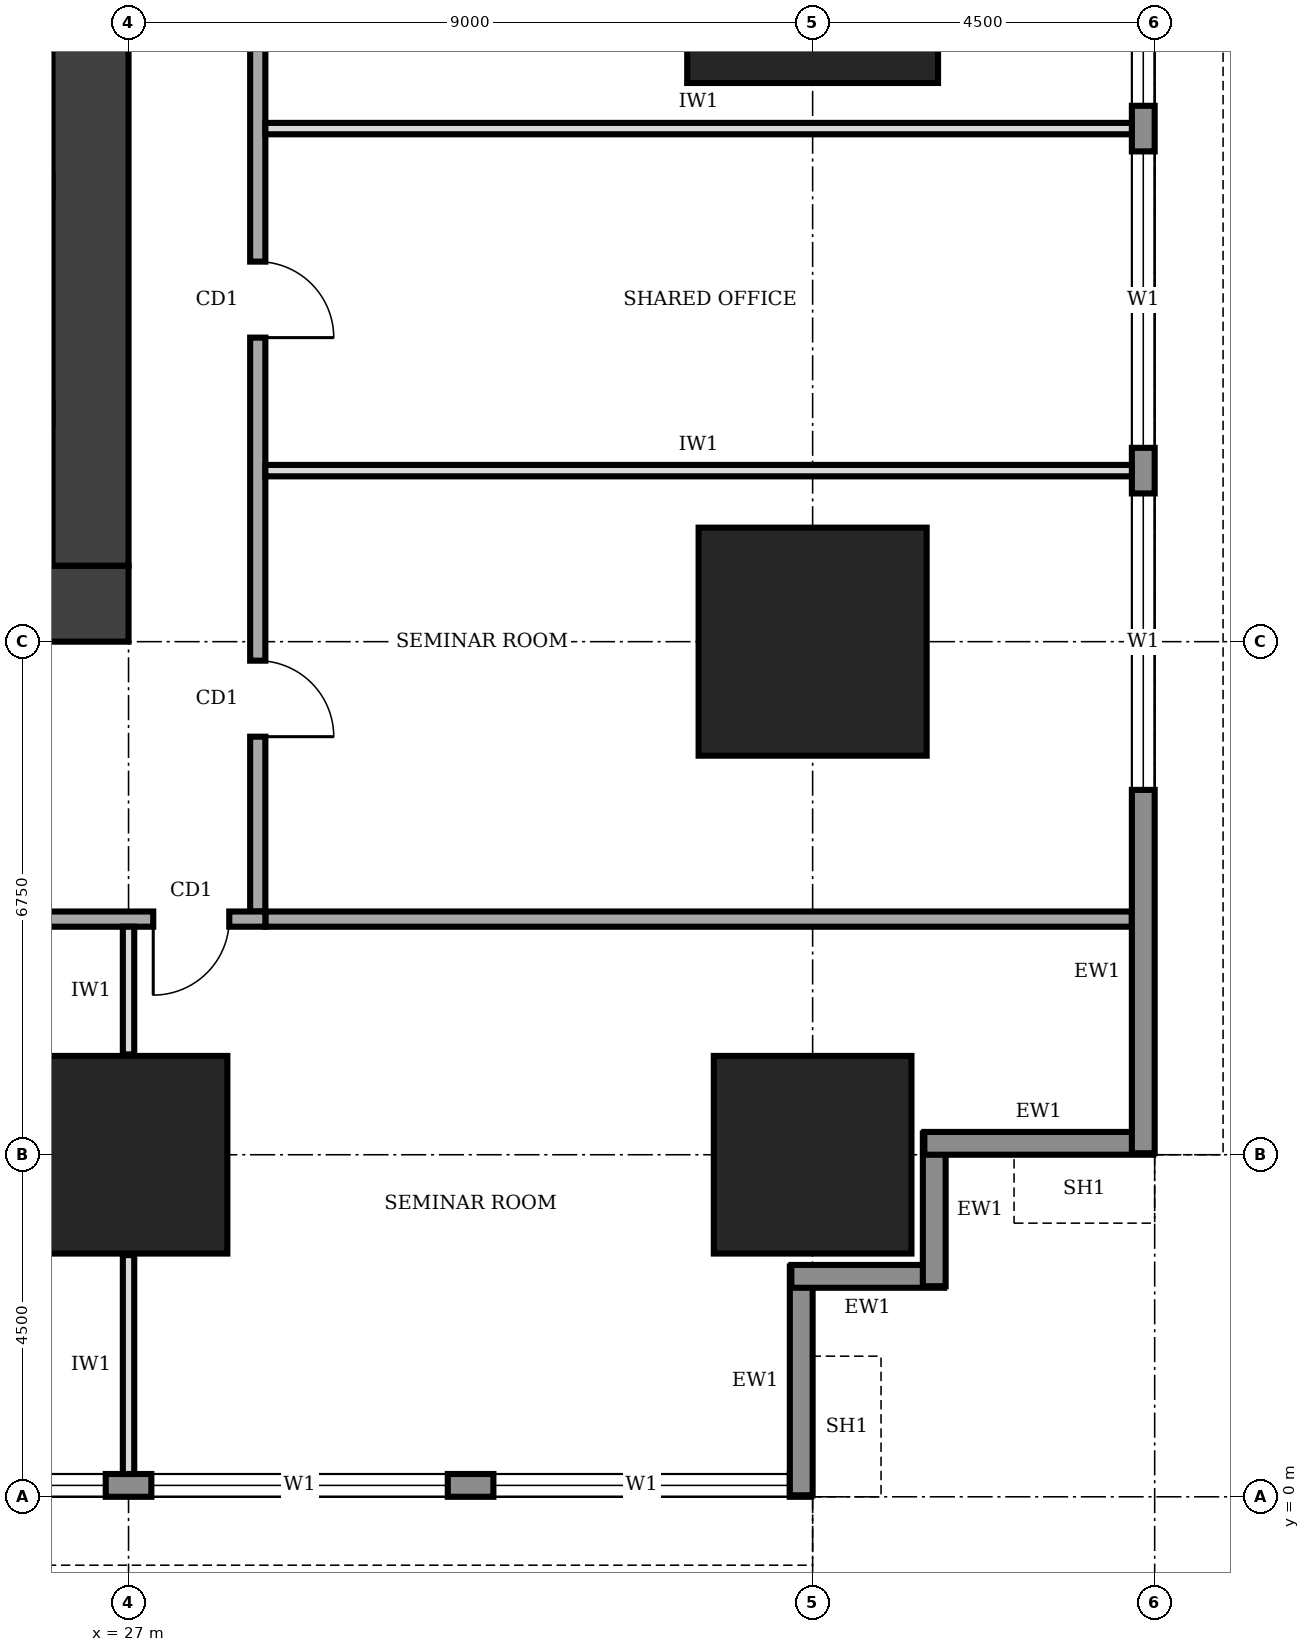
"""IFC4 building model, lengths in metres.
Left out: names, types, materials, properties, quantities, classifications, styles, units other than length and angle.
Written with IfcOpenShell. Run it as: python <this file> out.ifc"""

import sys

from ifc_helpers import new_model, si_unit, direction, frame, frame_2d, origin, origin_2d, place, context, subcontext, project, spatial, rectangle, extrude, element, fill, save


model = new_model("IFC4")
c1 = context("Model", 3, precision=1e-05, world=origin(), true_north=direction((0.0, 1.0)))
c2 = subcontext(c1, "Body", "Model", "MODEL_VIEW")
j1 = project(units=[si_unit("LENGTHUNIT", "METRE"), si_unit("PLANEANGLEUNIT", "RADIAN")], contexts=[c1])
p1 = place(None, origin())
s1 = spatial("IfcSite", under=j1, at=p1, CompositionType="ELEMENT")
p2 = place(p1, origin())
s2 = spatial("IfcBuilding", under=s1, at=p2, CompositionType="ELEMENT")
p3 = place(p2, frame((0.0, 0.0, 29.0)))
s3 = spatial("IfcBuildingStorey", under=s2, at=p3, CompositionType="ELEMENT", Elevation=29.0)
p4 = place(p3, frame((13.5, 11.75, 0.0), z_axis=(0.0, 0.0, 1.0), x_axis=(1.0, 0.0, 0.0)))
e1 = element("IfcWall", 1, at=p4, inside=s3, PredefinedType="SHEAR", context=c2, shape_type="SweptSolid", body=[
    extrude(rectangle(XDim=13.5, YDim=1.0, at=frame_2d((6.75, 0.0))), origin(), (0.0, 0.0, 1.0), 4.0),
])
p5 = place(p4, frame((4.75, 0.0, 0.0)))
e2 = element("IfcOpeningElement", 2, at=p5, cuts=e1, PredefinedType="OPENING", context=c2, shape_type="SweptSolid", body=[
    extrude(rectangle(XDim=1.0, YDim=2.1, at=frame_2d((0.5, 1.05))), frame((0.0, 0.51, 0.0), z_axis=(0.0, -1.0, 0.0), x_axis=(1.0, 0.0, 0.0)), (0.0, 0.0, 1.0), 1.02),
])
p6 = place(p3, frame((26.5, 12.25, 0.0), z_axis=(0.0, 0.0, 1.0), x_axis=(0.0, 1.0, 0.0)))
e3 = element("IfcWall", 3, at=p6, inside=s3, PredefinedType="SHEAR", context=c2, shape_type="SweptSolid", body=[
    extrude(rectangle(XDim=16.0, YDim=1.0, at=frame_2d((8.0, 0.0))), origin(), (0.0, 0.0, 1.0), 4.0),
])
for number, where, z_axis, x_axis in (
    (4, (27.0, 4.5, 0.0), (0.0, 0.0, 1.0), (1.0, 0.0, 0.0)),
    (5, (36.0, 4.5, 0.0), (0.0, 0.0, 1.0), (1.0, 0.0, 0.0)),
):
    element("IfcColumn", number, at=place(p3, frame(where, z_axis=z_axis, x_axis=x_axis)), inside=s3, PredefinedType="COLUMN", context=c2, shape_type="SweptSolid", body=[
        extrude(rectangle(XDim=2.6, YDim=2.6, at=origin_2d()), origin(), (0.0, 0.0, 1.0), 4.0),
    ])
p7 = place(p3, frame((36.0, 11.25, 0.0), z_axis=(0.0, 0.0, 1.0), x_axis=(1.0, 0.0, 0.0)))
e6 = element("IfcColumn", 6, at=p7, inside=s3, PredefinedType="COLUMN", context=c2, shape_type="SweptSolid", body=[
    extrude(rectangle(XDim=3.0, YDim=3.0, at=origin_2d()), origin(), (0.0, 0.0, 1.0), 4.0),
])
p8 = place(p3, frame((36.0, 20.25, 0.0), z_axis=(0.0, 0.0, 1.0), x_axis=(1.0, 0.0, 0.0)))
e7 = element("IfcColumn", 7, at=p8, inside=s3, PredefinedType="COLUMN", context=c2, shape_type="SweptSolid", body=[
    extrude(rectangle(XDim=3.3, YDim=3.3, at=origin_2d()), origin(), (0.0, 0.0, 1.0), 4.0),
])
p9 = place(p3, frame((4.52, 0.15, 0.0), z_axis=(0.0, 0.0, 1.0), x_axis=(1.0, 0.0, 0.0)))
e8 = element("IfcWall", 8, at=p9, inside=s3, PredefinedType="STANDARD", context=c2, shape_type="SweptSolid", body=[
    extrude(rectangle(XDim=31.46, YDim=0.3, at=frame_2d((15.73, 0.0))), origin(), (0.0, 0.0, 1.0), 3.75),
])
p10 = place(p9, frame((4.78, 0.0, 0.9)))
e9 = element("IfcOpeningElement", 9, at=p10, cuts=e8, PredefinedType="OPENING", context=c2, shape_type="SweptSolid", body=[
    extrude(rectangle(XDim=3.9, YDim=2.2, at=frame_2d((1.95, 1.1))), frame((0.0, 0.16, 0.0), z_axis=(0.0, -1.0, 0.0), x_axis=(1.0, 0.0, 0.0)), (0.0, 0.0, 1.0), 0.32),
])
p11 = place(p9, frame((9.28, 0.0, 0.9)))
e10 = element("IfcOpeningElement", 10, at=p11, cuts=e8, PredefinedType="OPENING", context=c2, shape_type="SweptSolid", body=[
    extrude(rectangle(XDim=3.9, YDim=2.2, at=frame_2d((1.95, 1.1))), frame((0.0, 0.16, 0.0), z_axis=(0.0, -1.0, 0.0), x_axis=(1.0, 0.0, 0.0)), (0.0, 0.0, 1.0), 0.32),
])
p12 = place(p9, frame((13.78, 0.0, 0.9)))
e11 = element("IfcOpeningElement", 11, at=p12, cuts=e8, PredefinedType="OPENING", context=c2, shape_type="SweptSolid", body=[
    extrude(rectangle(XDim=3.9, YDim=2.2, at=frame_2d((1.95, 1.1))), frame((0.0, 0.16, 0.0), z_axis=(0.0, -1.0, 0.0), x_axis=(1.0, 0.0, 0.0)), (0.0, 0.0, 1.0), 0.32),
])
p13 = place(p9, frame((18.28, 0.0, 0.9)))
e12 = element("IfcOpeningElement", 12, at=p13, cuts=e8, PredefinedType="OPENING", context=c2, shape_type="SweptSolid", body=[
    extrude(rectangle(XDim=3.9, YDim=2.2, at=frame_2d((1.95, 1.1))), frame((0.0, 0.16, 0.0), z_axis=(0.0, -1.0, 0.0), x_axis=(1.0, 0.0, 0.0)), (0.0, 0.0, 1.0), 0.32),
])
p14 = place(p9, frame((22.78, 0.0, 0.9)))
e13 = element("IfcOpeningElement", 13, at=p14, cuts=e8, PredefinedType="OPENING", context=c2, shape_type="SweptSolid", body=[
    extrude(rectangle(XDim=3.9, YDim=2.2, at=frame_2d((1.95, 1.1))), frame((0.0, 0.16, 0.0), z_axis=(0.0, -1.0, 0.0), x_axis=(1.0, 0.0, 0.0)), (0.0, 0.0, 1.0), 0.32),
])
p15 = place(p9, frame((27.28, 0.0, 0.9)))
e14 = element("IfcOpeningElement", 14, at=p15, cuts=e8, PredefinedType="OPENING", context=c2, shape_type="SweptSolid", body=[
    extrude(rectangle(XDim=3.9, YDim=2.2, at=frame_2d((1.95, 1.1))), frame((0.0, 0.16, 0.0), z_axis=(0.0, -1.0, 0.0), x_axis=(1.0, 0.0, 0.0)), (0.0, 0.0, 1.0), 0.32),
])
p16 = place(p3, frame((35.85, 0.02, 0.0), z_axis=(0.0, 0.0, 1.0), x_axis=(0.0, 1.0, 0.0)))
e15 = element("IfcWall", 15, at=p16, inside=s3, PredefinedType="STANDARD", context=c2, shape_type="SweptSolid", body=[
    extrude(rectangle(XDim=3.01, YDim=0.3, at=frame_2d((1.505, 0.0))), origin(), (0.0, 0.0, 1.0), 2.85),
])
for number, where, z_axis, x_axis in (
    (16, (35.72, 2.9, 0.0), (0.0, 0.0, 1.0), (1.0, 0.0, 0.0)),
    (17, (37.6, 2.77, 0.0), (0.0, 0.0, 1.0), (0.0, 1.0, 0.0)),
):
    element("IfcWall", number, at=place(p3, frame(where, z_axis=z_axis, x_axis=x_axis)), inside=s3, PredefinedType="STANDARD", context=c2, shape_type="SweptSolid", body=[
        extrude(rectangle(XDim=2.01, YDim=0.3, at=frame_2d((1.005, 0.0))), origin(), (0.0, 0.0, 1.0), 3.75),
    ])
p17 = place(p3, frame((37.47, 4.65, 0.0), z_axis=(0.0, 0.0, 1.0), x_axis=(1.0, 0.0, 0.0)))
e18 = element("IfcWall", 18, at=p17, inside=s3, PredefinedType="STANDARD", context=c2, shape_type="SweptSolid", body=[
    extrude(rectangle(XDim=3.01, YDim=0.3, at=frame_2d((1.505, 0.0))), origin(), (0.0, 0.0, 1.0), 2.85),
])
p18 = place(p3, frame((40.35, 4.52, 0.0), z_axis=(0.0, 0.0, 1.0), x_axis=(0.0, 1.0, 0.0)))
e19 = element("IfcWall", 19, at=p18, inside=s3, PredefinedType="STANDARD", context=c2, shape_type="SweptSolid", body=[
    extrude(rectangle(XDim=31.46, YDim=0.3, at=frame_2d((15.73, 0.0))), origin(), (0.0, 0.0, 1.0), 3.75),
])
p19 = place(p18, frame((4.78, 0.0, 0.9)))
e20 = element("IfcOpeningElement", 20, at=p19, cuts=e19, PredefinedType="OPENING", context=c2, shape_type="SweptSolid", body=[
    extrude(rectangle(XDim=3.9, YDim=2.2, at=frame_2d((1.95, 1.1))), frame((0.0, 0.16, 0.0), z_axis=(0.0, -1.0, 0.0), x_axis=(1.0, 0.0, 0.0)), (0.0, 0.0, 1.0), 0.32),
])
p20 = place(p18, frame((9.28, 0.0, 0.9)))
e21 = element("IfcOpeningElement", 21, at=p20, cuts=e19, PredefinedType="OPENING", context=c2, shape_type="SweptSolid", body=[
    extrude(rectangle(XDim=3.9, YDim=2.2, at=frame_2d((1.95, 1.1))), frame((0.0, 0.16, 0.0), z_axis=(0.0, -1.0, 0.0), x_axis=(1.0, 0.0, 0.0)), (0.0, 0.0, 1.0), 0.32),
])
p21 = place(p18, frame((13.78, 0.0, 0.9)))
e22 = element("IfcOpeningElement", 22, at=p21, cuts=e19, PredefinedType="OPENING", context=c2, shape_type="SweptSolid", body=[
    extrude(rectangle(XDim=3.9, YDim=2.2, at=frame_2d((1.95, 1.1))), frame((0.0, 0.16, 0.0), z_axis=(0.0, -1.0, 0.0), x_axis=(1.0, 0.0, 0.0)), (0.0, 0.0, 1.0), 0.32),
])
p22 = place(p18, frame((18.28, 0.0, 0.9)))
e23 = element("IfcOpeningElement", 23, at=p22, cuts=e19, PredefinedType="OPENING", context=c2, shape_type="SweptSolid", body=[
    extrude(rectangle(XDim=3.9, YDim=2.2, at=frame_2d((1.95, 1.1))), frame((0.0, 0.16, 0.0), z_axis=(0.0, -1.0, 0.0), x_axis=(1.0, 0.0, 0.0)), (0.0, 0.0, 1.0), 0.32),
])
p23 = place(p18, frame((22.78, 0.0, 0.9)))
e24 = element("IfcOpeningElement", 24, at=p23, cuts=e19, PredefinedType="OPENING", context=c2, shape_type="SweptSolid", body=[
    extrude(rectangle(XDim=3.9, YDim=2.2, at=frame_2d((1.95, 1.1))), frame((0.0, 0.16, 0.0), z_axis=(0.0, -1.0, 0.0), x_axis=(1.0, 0.0, 0.0)), (0.0, 0.0, 1.0), 0.32),
])
p24 = place(p18, frame((27.28, 0.0, 0.9)))
e25 = element("IfcOpeningElement", 25, at=p24, cuts=e19, PredefinedType="OPENING", context=c2, shape_type="SweptSolid", body=[
    extrude(rectangle(XDim=3.9, YDim=2.2, at=frame_2d((1.95, 1.1))), frame((0.0, 0.16, 0.0), z_axis=(0.0, -1.0, 0.0), x_axis=(1.0, 0.0, 0.0)), (0.0, 0.0, 1.0), 0.32),
])
p25 = place(p3, frame((11.9, 7.6, 0.0), z_axis=(0.0, 0.0, 1.0), x_axis=(1.0, 0.0, 0.0)))
e26 = element("IfcWall", 26, at=p25, inside=s3, PredefinedType="SOLIDWALL", context=c2, shape_type="SweptSolid", body=[
    extrude(rectangle(XDim=16.9, YDim=0.2, at=frame_2d((8.45, 0.0))), origin(), (0.0, 0.0, 1.0), 3.75),
])
p26 = place(p25, frame((0.275, 0.0, 0.0)))
e27 = element("IfcOpeningElement", 27, at=p26, cuts=e26, PredefinedType="OPENING", context=c2, shape_type="SweptSolid", body=[
    extrude(rectangle(XDim=1.0, YDim=2.1, at=frame_2d((0.5, 1.05))), frame((0.0, 0.11, 0.0), z_axis=(0.0, -1.0, 0.0), x_axis=(1.0, 0.0, 0.0)), (0.0, 0.0, 1.0), 0.22),
])
p27 = place(p25, frame((5.6, 0.0, 0.0)))
e28 = element("IfcOpeningElement", 28, at=p27, cuts=e26, PredefinedType="OPENING", context=c2, shape_type="SweptSolid", body=[
    extrude(rectangle(XDim=1.0, YDim=2.1, at=frame_2d((0.5, 1.05))), frame((0.0, 0.11, 0.0), z_axis=(0.0, -1.0, 0.0), x_axis=(1.0, 0.0, 0.0)), (0.0, 0.0, 1.0), 0.22),
])
p28 = place(p25, frame((12.35, 0.0, 0.0)))
e29 = element("IfcOpeningElement", 29, at=p28, cuts=e26, PredefinedType="OPENING", context=c2, shape_type="SweptSolid", body=[
    extrude(rectangle(XDim=1.0, YDim=2.1, at=frame_2d((0.5, 1.05))), frame((0.0, 0.11, 0.0), z_axis=(0.0, -1.0, 0.0), x_axis=(1.0, 0.0, 0.0)), (0.0, 0.0, 1.0), 0.22),
])
p29 = place(p25, frame((15.425, 0.0, 0.0)))
e30 = element("IfcOpeningElement", 30, at=p29, cuts=e26, PredefinedType="OPENING", context=c2, shape_type="SweptSolid", body=[
    extrude(rectangle(XDim=1.0, YDim=2.1, at=frame_2d((0.5, 1.05))), frame((0.0, 0.11, 0.0), z_axis=(0.0, -1.0, 0.0), x_axis=(1.0, 0.0, 0.0)), (0.0, 0.0, 1.0), 0.22),
])
p30 = place(p3, frame((28.7, 7.7, 0.0), z_axis=(0.0, 0.0, 1.0), x_axis=(0.0, 1.0, 0.0)))
e31 = element("IfcWall", 31, at=p30, inside=s3, PredefinedType="SOLIDWALL", context=c2, shape_type="SweptSolid", body=[
    extrude(rectangle(XDim=23.8, YDim=0.2, at=frame_2d((11.9, 0.0))), origin(), (0.0, 0.0, 1.0), 3.75),
])
p31 = place(p30, frame((2.3, 0.0, 0.0)))
e32 = element("IfcOpeningElement", 32, at=p31, cuts=e31, PredefinedType="OPENING", context=c2, shape_type="SweptSolid", body=[
    extrude(rectangle(XDim=1.0, YDim=2.1, at=frame_2d((0.5, 1.05))), frame((0.0, 0.11, 0.0), z_axis=(0.0, -1.0, 0.0), x_axis=(1.0, 0.0, 0.0)), (0.0, 0.0, 1.0), 0.22),
])
p32 = place(p30, frame((7.55, 0.0, 0.0)))
e33 = element("IfcOpeningElement", 33, at=p32, cuts=e31, PredefinedType="OPENING", context=c2, shape_type="SweptSolid", body=[
    extrude(rectangle(XDim=1.0, YDim=2.1, at=frame_2d((0.5, 1.05))), frame((0.0, 0.11, 0.0), z_axis=(0.0, -1.0, 0.0), x_axis=(1.0, 0.0, 0.0)), (0.0, 0.0, 1.0), 0.22),
])
p33 = place(p30, frame((12.05, 0.0, 0.0)))
e34 = element("IfcOpeningElement", 34, at=p33, cuts=e31, PredefinedType="OPENING", context=c2, shape_type="SweptSolid", body=[
    extrude(rectangle(XDim=1.0, YDim=2.1, at=frame_2d((0.5, 1.05))), frame((0.0, 0.11, 0.0), z_axis=(0.0, -1.0, 0.0), x_axis=(1.0, 0.0, 0.0)), (0.0, 0.0, 1.0), 0.22),
])
p34 = place(p30, frame((18.4, 0.0, 0.0)))
e35 = element("IfcOpeningElement", 35, at=p34, cuts=e31, PredefinedType="OPENING", context=c2, shape_type="SweptSolid", body=[
    extrude(rectangle(XDim=1.8, YDim=2.1, at=frame_2d((0.9, 1.05))), frame((0.0, 0.11, 0.0), z_axis=(0.0, -1.0, 0.0), x_axis=(1.0, 0.0, 0.0)), (0.0, 0.0, 1.0), 0.22),
])
p35 = place(p3, frame((28.8, 7.6, 0.0), z_axis=(0.0, 0.0, 1.0), x_axis=(1.0, 0.0, 0.0)))
e36 = element("IfcWall", 36, at=p35, inside=s3, PredefinedType="SOLIDWALL", context=c2, shape_type="SweptSolid", body=[
    extrude(rectangle(XDim=11.4, YDim=0.2, at=frame_2d((5.7, 0.0))), origin(), (0.0, 0.0, 1.0), 3.75),
])
p36 = place(p3, frame((27.0, 0.3, 0.0), z_axis=(0.0, 0.0, 1.0), x_axis=(0.0, 1.0, 0.0)))
e37 = element("IfcWall", 37, at=p36, inside=s3, PredefinedType="PARTITIONING", context=c2, shape_type="SweptSolid", body=[
    extrude(rectangle(XDim=2.88, YDim=0.15, at=frame_2d((1.44, 0.0))), origin(), (0.0, 0.0, 1.0), 2.85),
])
p37 = place(p3, frame((27.0, 5.82, 0.0), z_axis=(0.0, 0.0, 1.0), x_axis=(0.0, 1.0, 0.0)))
e38 = element("IfcWall", 38, at=p37, inside=s3, PredefinedType="PARTITIONING", context=c2, shape_type="SweptSolid", body=[
    extrude(rectangle(XDim=1.68, YDim=0.15, at=frame_2d((0.84, 0.0))), origin(), (0.0, 0.0, 1.0), 2.85),
])
for number, where, z_axis, x_axis in (
    (39, (28.8, 13.5, 0.0), (0.0, 0.0, 1.0), (1.0, 0.0, 0.0)),
    (40, (28.8, 18.0, 0.0), (0.0, 0.0, 1.0), (1.0, 0.0, 0.0)),
):
    element("IfcWall", number, at=place(p3, frame(where, z_axis=z_axis, x_axis=x_axis)), inside=s3, PredefinedType="PARTITIONING", context=c2, shape_type="SweptSolid", body=[
        extrude(rectangle(XDim=11.4, YDim=0.15, at=frame_2d((5.7, 0.0))), origin(), (0.0, 0.0, 1.0), 3.75),
    ])
p38 = place(p13, origin())
e41 = element("IfcWindow", 41, at=p38, inside=s3, PartitioningType="SINGLE_PANEL", PredefinedType="WINDOW", context=c2, shape_type="SweptSolid", body=[
    extrude(rectangle(XDim=3.9, YDim=2.2, at=frame_2d((1.95, 1.1))), frame((0.0, 0.03, 0.0), z_axis=(0.0, -1.0, 0.0), x_axis=(1.0, 0.0, 0.0)), (0.0, 0.0, 1.0), 0.06),
])
fill(e12, e41)
p39 = place(p14, origin())
e42 = element("IfcWindow", 42, at=p39, inside=s3, PartitioningType="SINGLE_PANEL", PredefinedType="WINDOW", context=c2, shape_type="SweptSolid", body=[
    extrude(rectangle(XDim=3.9, YDim=2.2, at=frame_2d((1.95, 1.1))), frame((0.0, 0.03, 0.0), z_axis=(0.0, -1.0, 0.0), x_axis=(1.0, 0.0, 0.0)), (0.0, 0.0, 1.0), 0.06),
])
fill(e13, e42)
p40 = place(p15, origin())
e43 = element("IfcWindow", 43, at=p40, inside=s3, PartitioningType="SINGLE_PANEL", PredefinedType="WINDOW", context=c2, shape_type="SweptSolid", body=[
    extrude(rectangle(XDim=3.9, YDim=2.2, at=frame_2d((1.95, 1.1))), frame((0.0, 0.03, 0.0), z_axis=(0.0, -1.0, 0.0), x_axis=(1.0, 0.0, 0.0)), (0.0, 0.0, 1.0), 0.06),
])
fill(e14, e43)
p41 = place(p19, origin())
e44 = element("IfcWindow", 44, at=p41, inside=s3, PartitioningType="SINGLE_PANEL", PredefinedType="WINDOW", context=c2, shape_type="SweptSolid", body=[
    extrude(rectangle(XDim=3.9, YDim=2.2, at=frame_2d((1.95, 1.1))), frame((0.0, 0.03, 0.0), z_axis=(0.0, -1.0, 0.0), x_axis=(1.0, 0.0, 0.0)), (0.0, 0.0, 1.0), 0.06),
])
fill(e20, e44)
p42 = place(p20, origin())
e45 = element("IfcWindow", 45, at=p42, inside=s3, PartitioningType="SINGLE_PANEL", PredefinedType="WINDOW", context=c2, shape_type="SweptSolid", body=[
    extrude(rectangle(XDim=3.9, YDim=2.2, at=frame_2d((1.95, 1.1))), frame((0.0, 0.03, 0.0), z_axis=(0.0, -1.0, 0.0), x_axis=(1.0, 0.0, 0.0)), (0.0, 0.0, 1.0), 0.06),
])
fill(e21, e45)
p43 = place(p21, origin())
e46 = element("IfcWindow", 46, at=p43, inside=s3, PartitioningType="SINGLE_PANEL", PredefinedType="WINDOW", context=c2, shape_type="SweptSolid", body=[
    extrude(rectangle(XDim=3.9, YDim=2.2, at=frame_2d((1.95, 1.1))), frame((0.0, 0.03, 0.0), z_axis=(0.0, -1.0, 0.0), x_axis=(1.0, 0.0, 0.0)), (0.0, 0.0, 1.0), 0.06),
])
fill(e22, e46)
p44 = place(p29, frame((1.0, 0.0, 0.0), z_axis=(0.0, 0.0, 1.0), x_axis=(-1.0, 0.0, 0.0)))
e47 = element("IfcDoor", 47, at=p44, inside=s3, OperationType="SINGLE_SWING_RIGHT", PredefinedType="DOOR", context=c2, shape_type="SweptSolid", body=[
    extrude(rectangle(XDim=1.0, YDim=2.1, at=frame_2d((0.5, 1.05))), frame((0.0, 0.025, 0.0), z_axis=(0.0, -1.0, 0.0), x_axis=(1.0, 0.0, 0.0)), (0.0, 0.0, 1.0), 0.05),
])
fill(e30, e47)
p45 = place(p31, frame((1.0, 0.0, 0.0), z_axis=(0.0, 0.0, 1.0), x_axis=(-1.0, 0.0, 0.0)))
e48 = element("IfcDoor", 48, at=p45, inside=s3, OperationType="SINGLE_SWING_RIGHT", PredefinedType="DOOR", context=c2, shape_type="SweptSolid", body=[
    extrude(rectangle(XDim=1.0, YDim=2.1, at=frame_2d((0.5, 1.05))), frame((0.0, 0.025, 0.0), z_axis=(0.0, -1.0, 0.0), x_axis=(1.0, 0.0, 0.0)), (0.0, 0.0, 1.0), 0.05),
])
fill(e32, e48)
p46 = place(p32, frame((1.0, 0.0, 0.0), z_axis=(0.0, 0.0, 1.0), x_axis=(-1.0, 0.0, 0.0)))
e49 = element("IfcDoor", 49, at=p46, inside=s3, OperationType="SINGLE_SWING_RIGHT", PredefinedType="DOOR", context=c2, shape_type="SweptSolid", body=[
    extrude(rectangle(XDim=1.0, YDim=2.1, at=frame_2d((0.5, 1.05))), frame((0.0, 0.025, 0.0), z_axis=(0.0, -1.0, 0.0), x_axis=(1.0, 0.0, 0.0)), (0.0, 0.0, 1.0), 0.05),
])
fill(e33, e49)
save(model, sys.argv[1])
